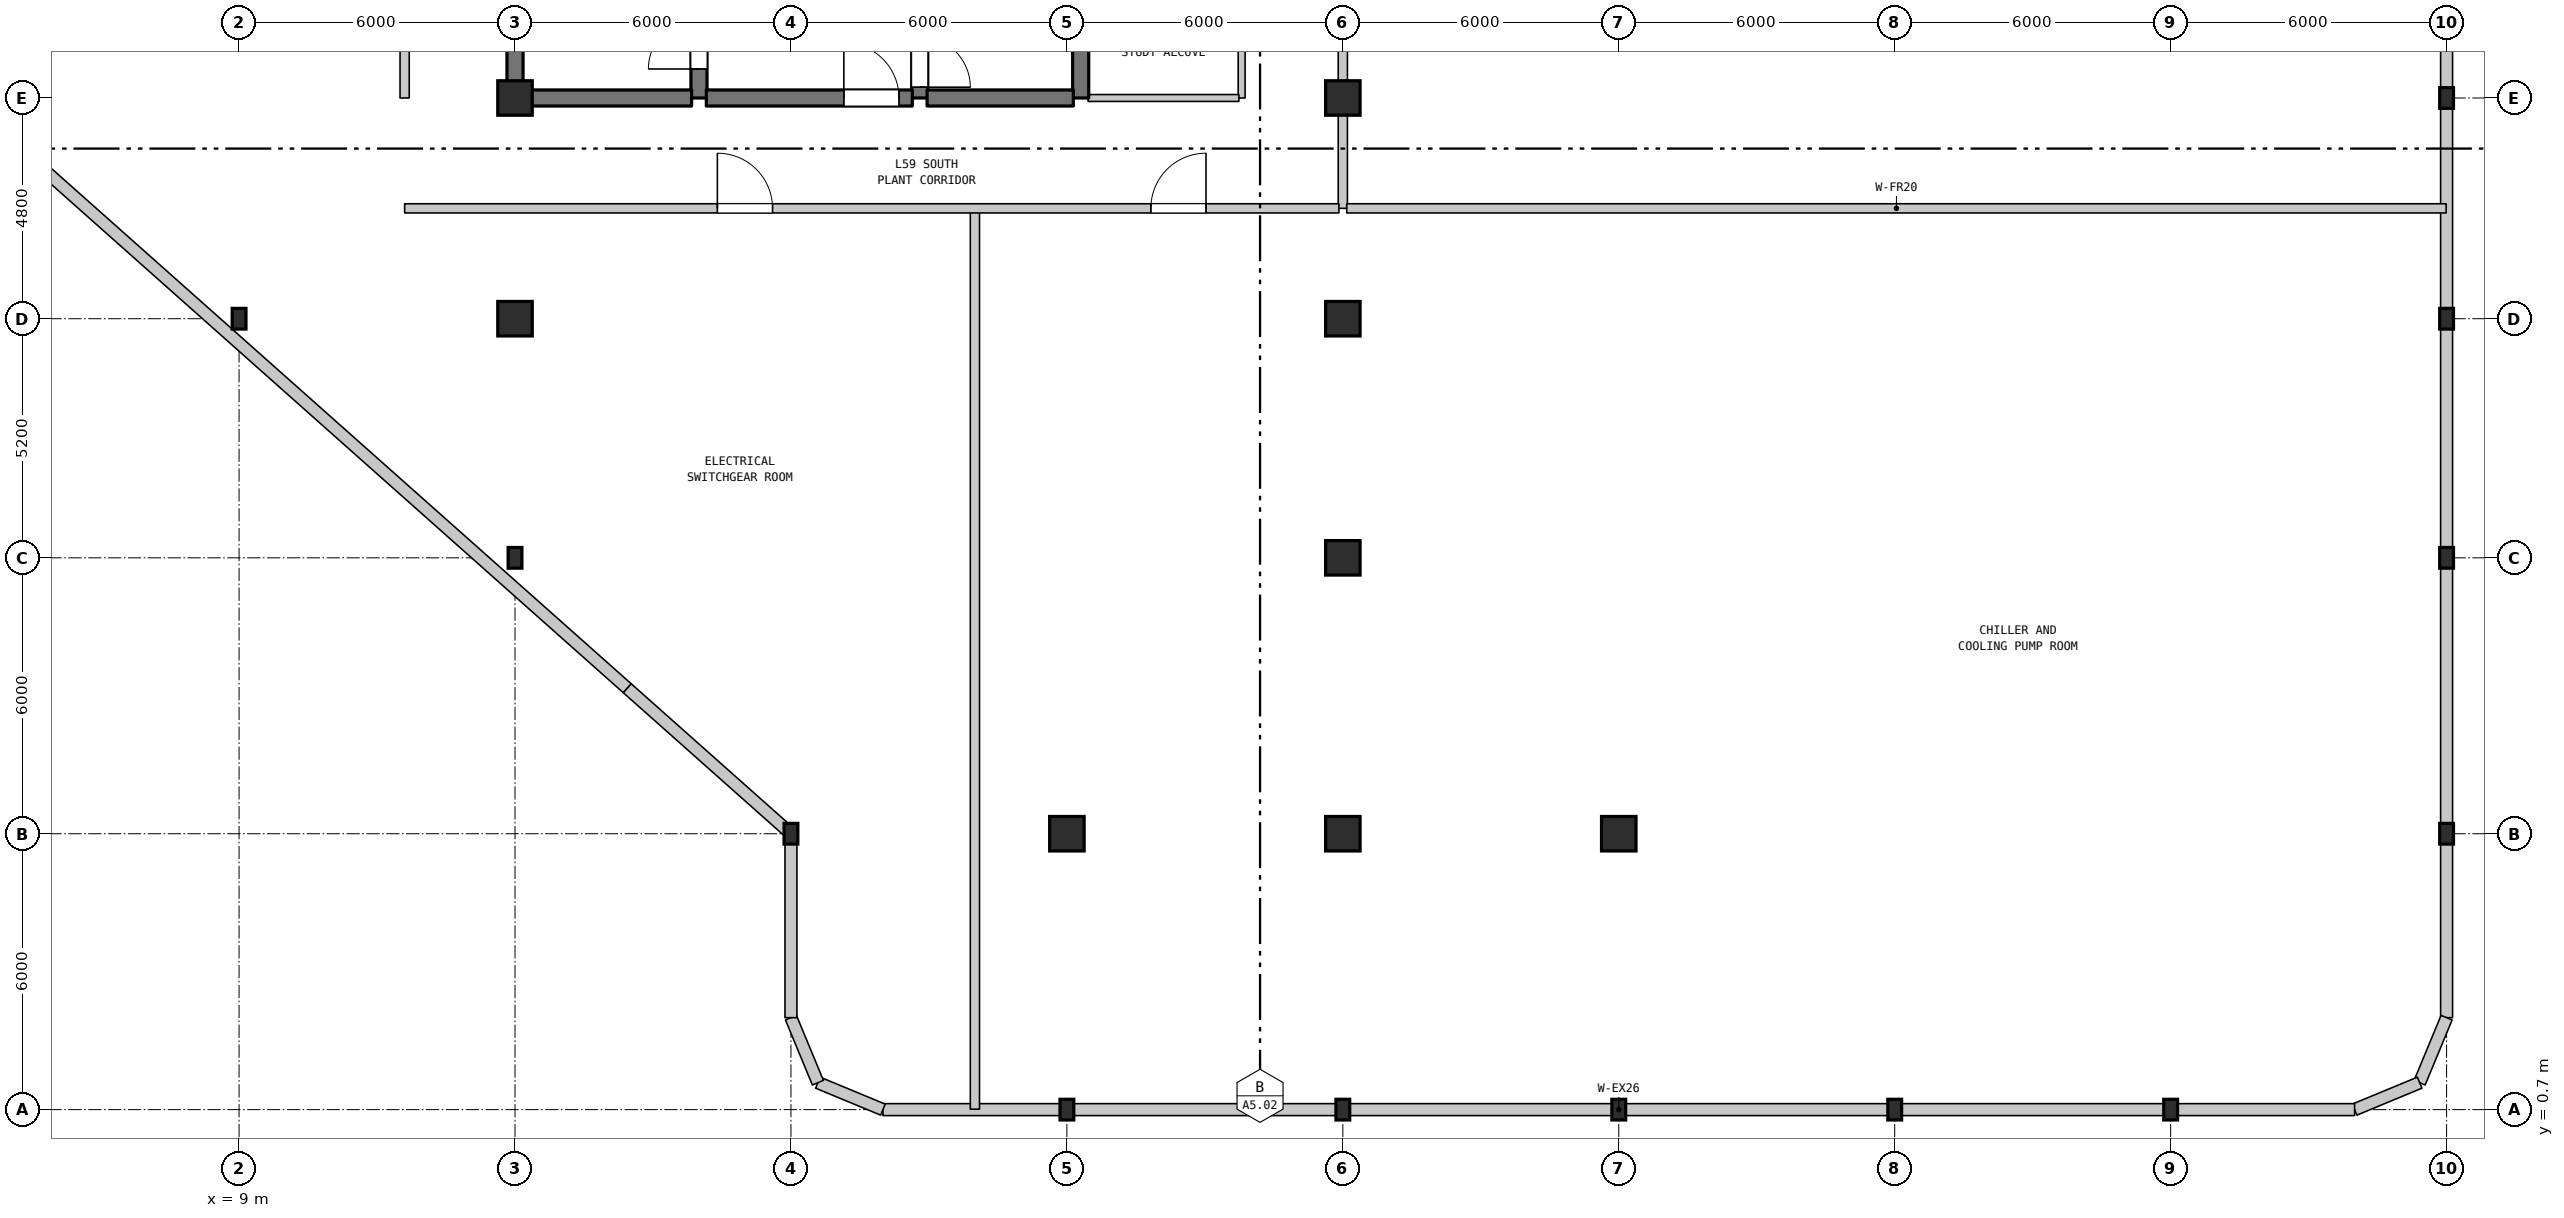
"""IFC4 building model, lengths in metres.
Left out: names, types, materials, properties, quantities, classifications, styles, units other than length and angle.
Written with IfcOpenShell. Run it as: python <this file> out.ifc"""

import sys

from ifc_helpers import new_model, si_unit, direction, frame, frame_2d, origin, origin_2d, place, context, subcontext, project, spatial, rectangle, i_section, extrude, element, fill, save


model = new_model("IFC4")
c1 = context("Model", 3, precision=1e-05, world=origin(), true_north=direction((0.0, 1.0)))
c2 = subcontext(c1, "Body", "Model", "MODEL_VIEW")
j1 = project(units=[si_unit("LENGTHUNIT", "METRE"), si_unit("PLANEANGLEUNIT", "RADIAN")], contexts=[c1])
p1 = place(None, origin())
s1 = spatial("IfcSite", under=j1, at=p1, CompositionType="ELEMENT")
p2 = place(p1, origin())
s2 = spatial("IfcBuilding", under=s1, at=p2, CompositionType="ELEMENT")
p3 = place(p2, frame((0.0, 0.0, 237.6)))
s3 = spatial("IfcBuildingStorey", under=s2, at=p3, CompositionType="ELEMENT", Elevation=237.6)
for number, where, z_axis, x_axis in (
    (1, (9.0, 17.9, 0.0), (0.0, 0.0, 1.0), (1.0, 0.0, 0.0)),
    (2, (15.0, 12.7, 0.0), (0.0, 0.0, 1.0), (1.0, 0.0, 0.0)),
):
    element("IfcColumn", number, at=place(p3, frame(where, z_axis=z_axis, x_axis=x_axis)), inside=s3, PredefinedType="COLUMN", context=c2, shape_type="SweptSolid", body=[
        extrude(i_section(OverallWidth=0.3, OverallDepth=0.45, WebThickness=0.014, FlangeThickness=0.026, FilletRadius=0.027, at=origin_2d()), origin(), (0.0, 0.0, 1.0), 5.2),
    ])
for number, where, z_axis, x_axis in (
    (3, (15.0, 17.9, 0.0), (0.0, 0.0, 1.0), (1.0, 0.0, 0.0)),
    (4, (15.0, 22.7, 0.0), (0.0, 0.0, 1.0), (1.0, 0.0, 0.0)),
):
    element("IfcColumn", number, at=place(p3, frame(where, z_axis=z_axis, x_axis=x_axis)), inside=s3, PredefinedType="COLUMN", context=c2, shape_type="SweptSolid", body=[
        extrude(rectangle(XDim=0.75, YDim=0.75, at=origin_2d()), origin(), (0.0, 0.0, 1.0), 5.2),
    ])
for number, where, z_axis, x_axis in (
    (5, (21.0, 6.7, 0.0), (0.0, 0.0, 1.0), (1.0, 0.0, 0.0)),
    (6, (27.0, 0.7, 0.0), (0.0, 0.0, 1.0), (1.0, 0.0, 0.0)),
):
    element("IfcColumn", number, at=place(p3, frame(where, z_axis=z_axis, x_axis=x_axis)), inside=s3, PredefinedType="COLUMN", context=c2, shape_type="SweptSolid", body=[
        extrude(i_section(OverallWidth=0.3, OverallDepth=0.45, WebThickness=0.014, FlangeThickness=0.026, FilletRadius=0.027, at=origin_2d()), origin(), (0.0, 0.0, 1.0), 5.2),
    ])
p4 = place(p3, frame((27.0, 6.7, 0.0), z_axis=(0.0, 0.0, 1.0), x_axis=(1.0, 0.0, 0.0)))
e7 = element("IfcColumn", 7, at=p4, inside=s3, PredefinedType="COLUMN", context=c2, shape_type="SweptSolid", body=[
    extrude(rectangle(XDim=0.75, YDim=0.75, at=origin_2d()), origin(), (0.0, 0.0, 1.0), 5.2),
])
p5 = place(p3, frame((33.0, 0.7, 0.0), z_axis=(0.0, 0.0, 1.0), x_axis=(1.0, 0.0, 0.0)))
e8 = element("IfcColumn", 8, at=p5, inside=s3, PredefinedType="COLUMN", context=c2, shape_type="SweptSolid", body=[
    extrude(i_section(OverallWidth=0.3, OverallDepth=0.45, WebThickness=0.014, FlangeThickness=0.026, FilletRadius=0.027, at=origin_2d()), origin(), (0.0, 0.0, 1.0), 5.2),
])
for number, where, z_axis, x_axis in (
    (9, (33.0, 6.7, 0.0), (0.0, 0.0, 1.0), (1.0, 0.0, 0.0)),
    (10, (33.0, 12.7, 0.0), (0.0, 0.0, 1.0), (1.0, 0.0, 0.0)),
    (11, (33.0, 17.9, 0.0), (0.0, 0.0, 1.0), (1.0, 0.0, 0.0)),
    (12, (33.0, 22.7, 0.0), (0.0, 0.0, 1.0), (1.0, 0.0, 0.0)),
):
    element("IfcColumn", number, at=place(p3, frame(where, z_axis=z_axis, x_axis=x_axis)), inside=s3, PredefinedType="COLUMN", context=c2, shape_type="SweptSolid", body=[
        extrude(rectangle(XDim=0.75, YDim=0.75, at=origin_2d()), origin(), (0.0, 0.0, 1.0), 5.2),
    ])
p6 = place(p3, frame((39.0, 0.7, 0.0), z_axis=(0.0, 0.0, 1.0), x_axis=(1.0, 0.0, 0.0)))
e13 = element("IfcColumn", 13, at=p6, inside=s3, PredefinedType="COLUMN", context=c2, shape_type="SweptSolid", body=[
    extrude(i_section(OverallWidth=0.3, OverallDepth=0.45, WebThickness=0.014, FlangeThickness=0.026, FilletRadius=0.027, at=origin_2d()), origin(), (0.0, 0.0, 1.0), 5.2),
])
p7 = place(p3, frame((39.0, 6.7, 0.0), z_axis=(0.0, 0.0, 1.0), x_axis=(1.0, 0.0, 0.0)))
e14 = element("IfcColumn", 14, at=p7, inside=s3, PredefinedType="COLUMN", context=c2, shape_type="SweptSolid", body=[
    extrude(rectangle(XDim=0.75, YDim=0.75, at=origin_2d()), origin(), (0.0, 0.0, 1.0), 5.2),
])
for number, where, z_axis, x_axis in (
    (15, (45.0, 0.7, 0.0), (0.0, 0.0, 1.0), (1.0, 0.0, 0.0)),
    (16, (51.0, 0.7, 0.0), (0.0, 0.0, 1.0), (1.0, 0.0, 0.0)),
    (17, (57.0, 6.7, 0.0), (0.0, 0.0, 1.0), (1.0, 0.0, 0.0)),
    (18, (57.0, 12.7, 0.0), (0.0, 0.0, 1.0), (1.0, 0.0, 0.0)),
    (19, (57.0, 17.9, 0.0), (0.0, 0.0, 1.0), (1.0, 0.0, 0.0)),
    (20, (57.0, 22.7, 0.0), (0.0, 0.0, 1.0), (1.0, 0.0, 0.0)),
):
    element("IfcColumn", number, at=place(p3, frame(where, z_axis=z_axis, x_axis=x_axis)), inside=s3, PredefinedType="COLUMN", context=c2, shape_type="SweptSolid", body=[
        extrude(i_section(OverallWidth=0.3, OverallDepth=0.45, WebThickness=0.014, FlangeThickness=0.026, FilletRadius=0.027, at=origin_2d()), origin(), (0.0, 0.0, 1.0), 5.2),
    ])
p8 = place(p3, frame((57.0, 25.9, 0.0), z_axis=(0.0, 0.0, 1.0), x_axis=(0.0, -1.0, 0.0)))
e21 = element("IfcWall", 21, at=p8, inside=s3, PredefinedType="STANDARD", context=c2, shape_type="SweptSolid", body=[
    extrude(rectangle(XDim=23.2, YDim=0.26, at=frame_2d((11.6, 0.0))), origin(), (0.0, 0.0, 1.0), 4.88),
])
for number, where, z_axis, x_axis in (
    (22, (57.0, 2.7, 0.0), (0.0, 0.0, 1.0), (-0.383, -0.924, 0.0)),
    (23, (56.414, 1.286, 0.0), (0.0, 0.0, 1.0), (-0.924, -0.383, 0.0)),
):
    element("IfcWall", number, at=place(p3, frame(where, z_axis=z_axis, x_axis=x_axis)), inside=s3, PredefinedType="STANDARD", context=c2, shape_type="SweptSolid", body=[
        extrude(rectangle(XDim=1.531, YDim=0.26, at=frame_2d((0.765, 0.0))), origin(), (0.0, 0.0, 1.0), 4.88),
    ])
p9 = place(p3, frame((55.0, 0.7, 0.0), z_axis=(0.0, 0.0, 1.0), x_axis=(-1.0, 0.0, 0.0)))
e24 = element("IfcWall", 24, at=p9, inside=s3, PredefinedType="STANDARD", context=c2, shape_type="SweptSolid", body=[
    extrude(rectangle(XDim=32.0, YDim=0.26, at=frame_2d((16.0, 0.0))), origin(), (0.0, 0.0, 1.0), 4.88),
])
for number, where, z_axis, x_axis in (
    (25, (23.0, 0.7, 0.0), (0.0, 0.0, 1.0), (-0.924, 0.383, 0.0)),
    (26, (21.586, 1.286, 0.0), (0.0, 0.0, 1.0), (-0.383, 0.924, 0.0)),
):
    element("IfcWall", number, at=place(p3, frame(where, z_axis=z_axis, x_axis=x_axis)), inside=s3, PredefinedType="STANDARD", context=c2, shape_type="SweptSolid", body=[
        extrude(rectangle(XDim=1.531, YDim=0.26, at=frame_2d((0.765, 0.0))), origin(), (0.0, 0.0, 1.0), 4.88),
    ])
p10 = place(p3, frame((21.0, 2.7, 0.0), z_axis=(0.0, 0.0, 1.0), x_axis=(0.0, 1.0, 0.0)))
e27 = element("IfcWall", 27, at=p10, inside=s3, PredefinedType="STANDARD", context=c2, shape_type="SweptSolid", body=[
    extrude(rectangle(XDim=4.0, YDim=0.26, at=frame_2d((2.0, 0.0))), origin(), (0.0, 0.0, 1.0), 4.88),
])
p11 = place(p3, frame((21.0, 6.7, 0.0), z_axis=(0.0, 0.0, 1.0), x_axis=(-0.74741780008, 0.664354297137, 0.0)))
e28 = element("IfcWall", 28, at=p11, inside=s3, PredefinedType="STANDARD", context=c2, shape_type="SweptSolid", body=[
    extrude(rectangle(XDim=4.764, YDim=0.26, at=frame_2d((2.382, 0.0))), origin(), (0.0, 0.0, 1.0), 4.54),
])
p12 = place(p3, frame((12.6, 22.7, 0.0), z_axis=(0.0, 0.0, 1.0), x_axis=(0.0, 1.0, 0.0)))
e29 = element("IfcWall", 29, at=p12, inside=s3, PredefinedType="STANDARD", context=c2, shape_type="SweptSolid", body=[
    extrude(rectangle(XDim=15.2, YDim=0.2, at=frame_2d((7.6, 0.0))), origin(), (0.0, 0.0, 1.0), 4.88),
])
p13 = place(p12, frame((7.0, 0.0, 0.0)))
e30 = element("IfcOpeningElement", 30, at=p13, cuts=e29, PredefinedType="OPENING", context=c2, shape_type="SweptSolid", body=[
    extrude(rectangle(XDim=1.2, YDim=2.2, at=frame_2d((0.6, 1.1))), frame((0.0, 0.11, 0.0), z_axis=(0.0, -1.0, 0.0), x_axis=(1.0, 0.0, 0.0)), (0.0, 0.0, 1.0), 0.22),
])
p14 = place(p3, frame((15.0, 22.7, 0.0), z_axis=(0.0, 0.0, 1.0), x_axis=(0.0, 1.0, 0.0)))
e31 = element("IfcWall", 31, at=p14, inside=s3, PredefinedType="SHEAR", context=c2, shape_type="SweptSolid", body=[
    extrude(rectangle(XDim=6.8, YDim=0.35, at=frame_2d((3.4, 0.0))), origin(), (0.0, 0.0, 1.0), 4.88),
])
p15 = place(p3, frame((19.0, 22.7, 0.0), z_axis=(0.0, 0.0, 1.0), x_axis=(0.0, 1.0, 0.0)))
e32 = element("IfcWall", 32, at=p15, inside=s3, PredefinedType="SHEAR", context=c2, shape_type="SweptSolid", body=[
    extrude(rectangle(XDim=5.5, YDim=0.35, at=frame_2d((2.75, 0.0))), origin(), (0.0, 0.0, 1.0), 4.88),
])
p16 = place(p15, frame((0.631, 0.0, 0.0)))
e33 = element("IfcOpeningElement", 33, at=p16, cuts=e32, PredefinedType="OPENING", context=c2, shape_type="SweptSolid", body=[
    extrude(rectangle(XDim=1.1, YDim=2.15, at=frame_2d((0.55, 1.075))), frame((0.0, 0.185, 0.0), z_axis=(0.0, -1.0, 0.0), x_axis=(1.0, 0.0, 0.0)), (0.0, 0.0, 1.0), 0.37),
])
p17 = place(p3, frame((23.8, 22.7, 0.0), z_axis=(0.0, 0.0, 1.0), x_axis=(0.0, 1.0, 0.0)))
e34 = element("IfcWall", 34, at=p17, inside=s3, PredefinedType="SHEAR", context=c2, shape_type="SweptSolid", body=[
    extrude(rectangle(XDim=5.5, YDim=0.35, at=frame_2d((2.75, 0.0))), origin(), (0.0, 0.0, 1.0), 4.88),
])
p18 = place(p17, frame((0.235, 0.0, 0.0)))
e35 = element("IfcOpeningElement", 35, at=p18, cuts=e34, PredefinedType="OPENING", context=c2, shape_type="SweptSolid", body=[
    extrude(rectangle(XDim=1.1, YDim=2.15, at=frame_2d((0.55, 1.075))), frame((0.0, 0.185, 0.0), z_axis=(0.0, -1.0, 0.0), x_axis=(1.0, 0.0, 0.0)), (0.0, 0.0, 1.0), 0.37),
])
p19 = place(p3, frame((25.0, 0.71, 0.0), z_axis=(0.0, 0.0, 1.0), x_axis=(0.0, 1.0, 0.0)))
e36 = element("IfcWall", 36, at=p19, inside=s3, PredefinedType="STANDARD", context=c2, shape_type="SweptSolid", body=[
    extrude(rectangle(XDim=19.59, YDim=0.2, at=frame_2d((9.795, 0.0))), origin(), (0.0, 0.0, 1.0), 4.88),
])
p20 = place(p3, frame((27.3, 22.7, 0.0), z_axis=(0.0, 0.0, 1.0), x_axis=(0.0, 1.0, 0.0)))
e37 = element("IfcWall", 37, at=p20, inside=s3, PredefinedType="SHEAR", context=c2, shape_type="SweptSolid", body=[
    extrude(rectangle(XDim=2.9, YDim=0.35, at=frame_2d((1.45, 0.0))), origin(), (0.0, 0.0, 1.0), 4.88),
])
p21 = place(p3, frame((30.8, 22.7, 0.0), z_axis=(0.0, 0.0, 1.0), x_axis=(0.0, 1.0, 0.0)))
e38 = element("IfcWall", 38, at=p21, inside=s3, PredefinedType="STANDARD", context=c2, shape_type="SweptSolid", body=[
    extrude(rectangle(XDim=2.9, YDim=0.15, at=frame_2d((1.45, 0.0))), origin(), (0.0, 0.0, 1.0), 4.88),
])
p22 = place(p3, frame((33.0, 20.3, 0.0), z_axis=(0.0, 0.0, 1.0), x_axis=(0.0, 1.0, 0.0)))
e39 = element("IfcWall", 39, at=p22, inside=s3, PredefinedType="STANDARD", context=c2, shape_type="SweptSolid", body=[
    extrude(rectangle(XDim=7.6, YDim=0.2, at=frame_2d((3.8, 0.0))), origin(), (0.0, 0.0, 1.0), 4.59),
])
p23 = place(p22, frame((4.6, 0.0, 0.0)))
e40 = element("IfcOpeningElement", 40, at=p23, cuts=e39, PredefinedType="OPENING", context=c2, shape_type="SweptSolid", body=[
    extrude(rectangle(XDim=1.2, YDim=2.2, at=frame_2d((0.6, 1.1))), frame((0.0, 0.11, 0.0), z_axis=(0.0, -1.0, 0.0), x_axis=(1.0, 0.0, 0.0)), (0.0, 0.0, 1.0), 0.22),
])
p24 = place(p3, frame((12.6, 20.3, 0.0), z_axis=(0.0, 0.0, 1.0), x_axis=(1.0, 0.0, 0.0)))
e41 = element("IfcWall", 41, at=p24, inside=s3, PredefinedType="STANDARD", context=c2, shape_type="SweptSolid", body=[
    extrude(rectangle(XDim=20.315, YDim=0.2, at=frame_2d((10.157, 0.0))), origin(), (0.0, 0.0, 1.0), 4.88),
])
p25 = place(p24, frame((6.8, 0.0, 0.0)))
e42 = element("IfcOpeningElement", 42, at=p25, cuts=e41, PredefinedType="OPENING", context=c2, shape_type="SweptSolid", body=[
    extrude(rectangle(XDim=1.2, YDim=2.2, at=frame_2d((0.6, 1.1))), frame((0.0, 0.11, 0.0), z_axis=(0.0, -1.0, 0.0), x_axis=(1.0, 0.0, 0.0)), (0.0, 0.0, 1.0), 0.22),
])
p26 = place(p24, frame((16.225, 0.0, 0.0)))
e43 = element("IfcOpeningElement", 43, at=p26, cuts=e41, PredefinedType="OPENING", context=c2, shape_type="SweptSolid", body=[
    extrude(rectangle(XDim=1.2, YDim=2.2, at=frame_2d((0.6, 1.1))), frame((0.0, 0.11, 0.0), z_axis=(0.0, -1.0, 0.0), x_axis=(1.0, 0.0, 0.0)), (0.0, 0.0, 1.0), 0.22),
])
p27 = place(p3, frame((33.085, 20.3, 0.0), z_axis=(0.0, 0.0, 1.0), x_axis=(1.0, 0.0, 0.0)))
e44 = element("IfcWall", 44, at=p27, inside=s3, PredefinedType="STANDARD", context=c2, shape_type="SweptSolid", body=[
    extrude(rectangle(XDim=23.905, YDim=0.2, at=frame_2d((11.953, 0.0))), origin(), (0.0, 0.0, 1.0), 4.88),
])
p28 = place(p3, frame((15.16, 22.7, 0.0), z_axis=(0.0, 0.0, 1.0), x_axis=(1.0, 0.0, 0.0)))
e45 = element("IfcWall", 45, at=p28, inside=s3, PredefinedType="SHEAR", context=c2, shape_type="SweptSolid", body=[
    extrude(rectangle(XDim=3.68, YDim=0.35, at=frame_2d((1.84, 0.0))), origin(), (0.0, 0.0, 1.0), 4.88),
])
p29 = place(p3, frame((19.16, 22.7, 0.0), z_axis=(0.0, 0.0, 1.0), x_axis=(1.0, 0.0, 0.0)))
e46 = element("IfcWall", 46, at=p29, inside=s3, PredefinedType="SHEAR", context=c2, shape_type="SweptSolid", body=[
    extrude(rectangle(XDim=4.48, YDim=0.35, at=frame_2d((2.24, 0.0))), origin(), (0.0, 0.0, 1.0), 4.88),
])
p30 = place(p29, frame((2.99, 0.0, 0.0)))
e47 = element("IfcOpeningElement", 47, at=p30, cuts=e46, PredefinedType="OPENING", context=c2, shape_type="SweptSolid", body=[
    extrude(rectangle(XDim=1.2, YDim=2.2, at=frame_2d((0.6, 1.1))), frame((0.0, 0.185, 0.0), z_axis=(0.0, -1.0, 0.0), x_axis=(1.0, 0.0, 0.0)), (0.0, 0.0, 1.0), 0.37),
])
p31 = place(p3, frame((23.96, 22.7, 0.0), z_axis=(0.0, 0.0, 1.0), x_axis=(1.0, 0.0, 0.0)))
e48 = element("IfcWall", 48, at=p31, inside=s3, PredefinedType="SHEAR", context=c2, shape_type="SweptSolid", body=[
    extrude(rectangle(XDim=3.18, YDim=0.35, at=frame_2d((1.59, 0.0))), origin(), (0.0, 0.0, 1.0), 4.88),
])
p32 = place(p3, frame((27.46, 22.7, 0.0), z_axis=(0.0, 0.0, 1.0), x_axis=(1.0, 0.0, 0.0)))
e49 = element("IfcWall", 49, at=p32, inside=s3, PredefinedType="STANDARD", context=c2, shape_type="SweptSolid", body=[
    extrude(rectangle(XDim=3.28, YDim=0.15, at=frame_2d((1.64, 0.0))), origin(), (0.0, 0.0, 1.0), 4.88),
])
p33 = place(p3, frame((17.439, 9.865, 0.0), z_axis=(0.0, 0.0, 1.0), x_axis=(-0.747407065455, 0.664366373703, 0.0)))
e50 = element("IfcWall", 50, at=p33, inside=s3, PredefinedType="STANDARD", context=c2, shape_type="SweptSolid", body=[
    extrude(rectangle(XDim=17.934, YDim=0.26, at=frame_2d((8.967, 0.0))), origin(), (0.0, 0.0, 1.0), 4.88),
])
p34 = place(p16, origin())
e51 = element("IfcDoor", 51, at=p34, inside=s3, OperationType="SINGLE_SWING_LEFT", PredefinedType="DOOR", context=c2, shape_type="SweptSolid", body=[
    extrude(rectangle(XDim=1.1, YDim=2.15, at=frame_2d((0.55, 1.075))), frame((0.0, 0.025, 0.0), z_axis=(0.0, -1.0, 0.0), x_axis=(1.0, 0.0, 0.0)), (0.0, 0.0, 1.0), 0.05),
])
fill(e33, e51)
p35 = place(p18, frame((1.1, 0.0, 0.0), z_axis=(0.0, 0.0, 1.0), x_axis=(-1.0, 0.0, 0.0)))
e52 = element("IfcDoor", 52, at=p35, inside=s3, OperationType="SINGLE_SWING_LEFT", PredefinedType="DOOR", context=c2, shape_type="SweptSolid", body=[
    extrude(rectangle(XDim=1.1, YDim=2.15, at=frame_2d((0.55, 1.075))), frame((0.0, 0.025, 0.0), z_axis=(0.0, -1.0, 0.0), x_axis=(1.0, 0.0, 0.0)), (0.0, 0.0, 1.0), 0.05),
])
fill(e35, e52)
p36 = place(p25, origin())
e53 = element("IfcDoor", 53, at=p36, inside=s3, OperationType="SINGLE_SWING_LEFT", PredefinedType="DOOR", context=c2, shape_type="SweptSolid", body=[
    extrude(rectangle(XDim=1.2, YDim=2.2, at=frame_2d((0.6, 1.1))), frame((0.0, 0.025, 0.0), z_axis=(0.0, -1.0, 0.0), x_axis=(1.0, 0.0, 0.0)), (0.0, 0.0, 1.0), 0.05),
])
fill(e42, e53)
p37 = place(p26, origin())
e54 = element("IfcDoor", 54, at=p37, inside=s3, OperationType="SINGLE_SWING_RIGHT", PredefinedType="DOOR", context=c2, shape_type="SweptSolid", body=[
    extrude(rectangle(XDim=1.2, YDim=2.2, at=frame_2d((0.6, 1.1))), frame((0.0, 0.025, 0.0), z_axis=(0.0, -1.0, 0.0), x_axis=(1.0, 0.0, 0.0)), (0.0, 0.0, 1.0), 0.05),
])
fill(e43, e54)
p38 = place(p30, origin())
e55 = element("IfcDoor", 55, at=p38, inside=s3, OperationType="SINGLE_SWING_LEFT", PredefinedType="DOOR", context=c2, shape_type="SweptSolid", body=[
    extrude(rectangle(XDim=1.2, YDim=2.2, at=frame_2d((0.6, 1.1))), frame((0.0, 0.025, 0.0), z_axis=(0.0, -1.0, 0.0), x_axis=(1.0, 0.0, 0.0)), (0.0, 0.0, 1.0), 0.05),
])
fill(e47, e55)
save(model, sys.argv[1])
